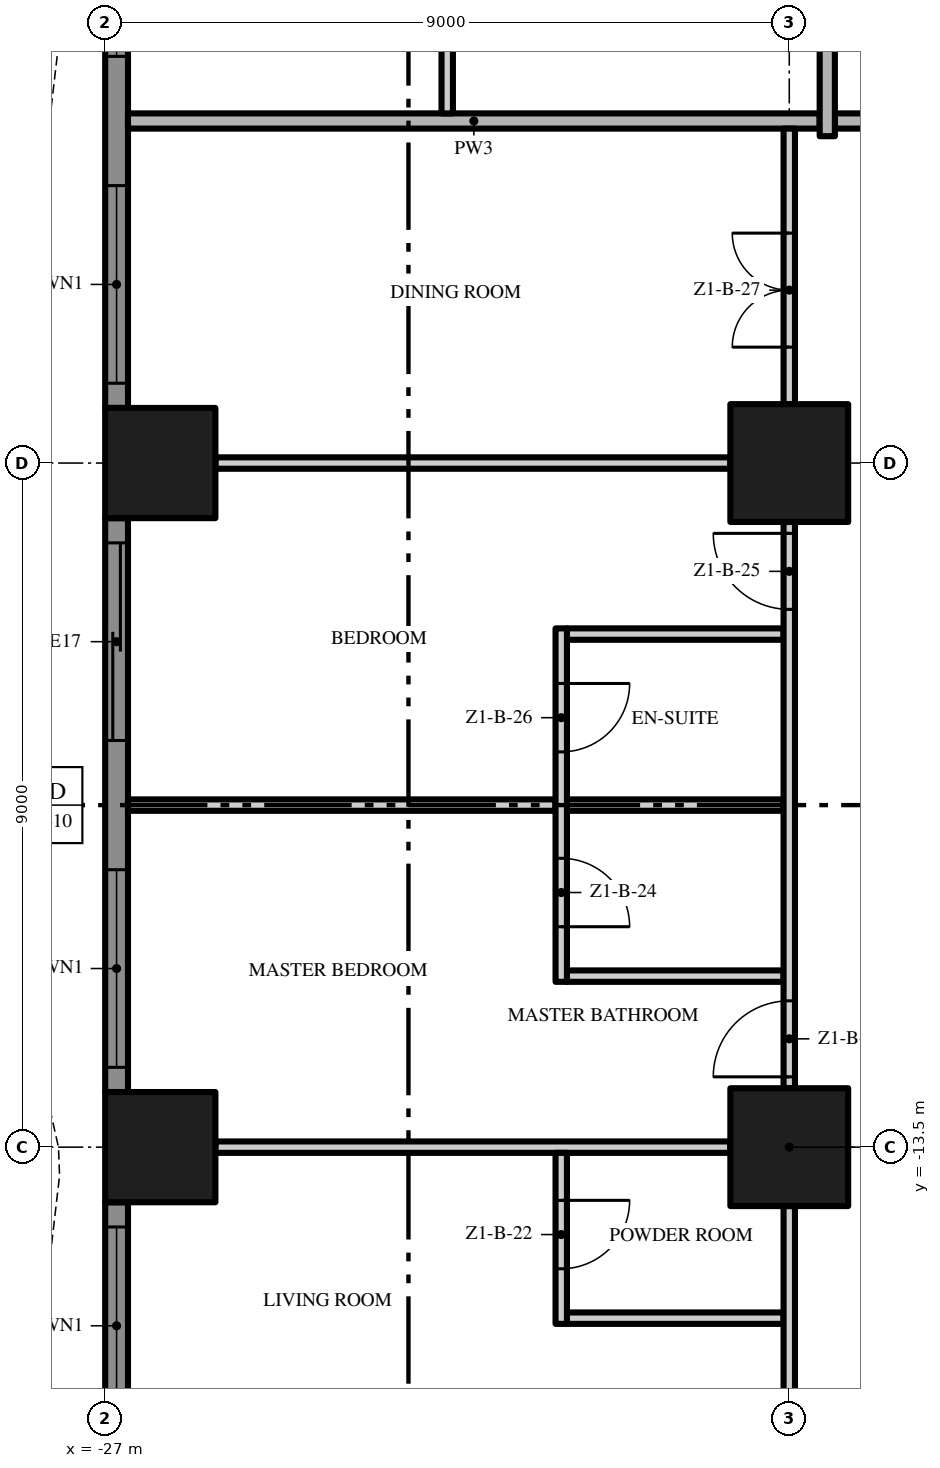
"""IFC4 building model, lengths in metres.
Left out: names, types, materials, properties, quantities, classifications, styles, units other than length and angle.
Written with IfcOpenShell. Run it as: python <this file> out.ifc"""

import sys

from ifc_helpers import new_model, si_unit, direction, frame, frame_2d, origin, origin_2d, place, context, subcontext, project, spatial, polyline, rectangle, outline, extrude, element, fill, save


model = new_model("IFC4")
c1 = context("Model", 3, precision=1e-05, world=origin(), true_north=direction((0.0, 1.0)))
c2 = subcontext(c1, "Body", "Model", "MODEL_VIEW")
j1 = project(units=[si_unit("LENGTHUNIT", "METRE"), si_unit("PLANEANGLEUNIT", "RADIAN")], contexts=[c1])
p1 = place(None, origin())
s1 = spatial("IfcSite", under=j1, at=p1, CompositionType="ELEMENT")
p2 = place(p1, origin())
s2 = spatial("IfcBuilding", under=s1, at=p2, CompositionType="ELEMENT")
p3 = place(p2, frame((0.0, 0.0, 34.0)))
s3 = spatial("IfcBuildingStorey", under=s2, at=p3, CompositionType="ELEMENT", Elevation=34.0)
for number, where, z_axis, x_axis in (
    (1, (-18.0, -13.5, 0.0), (0.0, 0.0, 1.0), (1.0, 0.0, 0.0)),
    (2, (-18.0, -4.5, 0.0), (0.0, 0.0, 1.0), (1.0, 0.0, 0.0)),
):
    element("IfcColumn", number, at=place(p3, frame(where, z_axis=z_axis, x_axis=x_axis)), inside=s3, PredefinedType="COLUMN", context=c2, shape_type="SweptSolid", body=[
        extrude(rectangle(XDim=1.55, YDim=1.55, at=origin_2d()), origin(), (0.0, 0.0, 1.0), 3.5),
    ])
for number, where, z_axis, x_axis in (
    (3, (-26.275, -13.5, 0.0), (0.0, 0.0, 1.0), (1.0, 0.0, 0.0)),
    (4, (-26.275, -4.5, 0.0), (0.0, 0.0, 1.0), (1.0, 0.0, 0.0)),
):
    element("IfcColumn", number, at=place(p3, frame(where, z_axis=z_axis, x_axis=x_axis)), inside=s3, PredefinedType="COLUMN", context=c2, shape_type="SweptSolid", body=[
        extrude(rectangle(XDim=1.45, YDim=1.45, at=origin_2d()), origin(), (0.0, 0.0, 1.0), 3.5),
    ])
p4 = place(p3, frame((-26.85, -3.775, 0.0), z_axis=(0.0, 0.0, 1.0), x_axis=(0.0, 1.0, 0.0)))
e5 = element("IfcWall", 5, at=p4, inside=s3, PredefinedType="SOLIDWALL", context=c2, shape_type="SweptSolid", body=[
    extrude(rectangle(XDim=7.55, YDim=0.3, at=frame_2d((3.775, 0.0))), origin(), (0.0, 0.0, 1.0), 3.5),
])
p5 = place(p4, frame((4.625, 0.0, 0.45)))
e6 = element("IfcOpeningElement", 6, at=p5, cuts=e5, PredefinedType="OPENING", context=c2, shape_type="SweptSolid", body=[
    extrude(rectangle(XDim=2.6, YDim=2.65, at=frame_2d((1.3, 1.325))), frame((0.0, 0.16, 0.0), z_axis=(0.0, -1.0, 0.0), x_axis=(1.0, 0.0, 0.0)), (0.0, 0.0, 1.0), 0.32),
])
p6 = place(p4, frame((0.325, 0.0, 0.45)))
e7 = element("IfcOpeningElement", 7, at=p6, cuts=e5, PredefinedType="OPENING", context=c2, shape_type="SweptSolid", body=[
    extrude(rectangle(XDim=2.6, YDim=2.65, at=frame_2d((1.3, 1.325))), frame((0.0, 0.16, 0.0), z_axis=(0.0, -1.0, 0.0), x_axis=(1.0, 0.0, 0.0)), (0.0, 0.0, 1.0), 0.32),
])
p7 = place(p3, frame((-26.85, -12.775, 0.0), z_axis=(0.0, 0.0, 1.0), x_axis=(0.0, 1.0, 0.0)))
e8 = element("IfcWall", 8, at=p7, inside=s3, PredefinedType="SOLIDWALL", context=c2, shape_type="SweptSolid", body=[
    extrude(rectangle(XDim=7.55, YDim=0.3, at=frame_2d((3.775, 0.0))), origin(), (0.0, 0.0, 1.0), 3.5),
])
p8 = place(p7, frame((4.625, 0.0, 0.0)))
e9 = element("IfcOpeningElement", 9, at=p8, cuts=e8, PredefinedType="OPENING", context=c2, shape_type="SweptSolid", body=[
    extrude(rectangle(XDim=2.6, YDim=2.4, at=frame_2d((1.3, 1.2))), frame((0.0, 0.16, 0.0), z_axis=(0.0, -1.0, 0.0), x_axis=(1.0, 0.0, 0.0)), (0.0, 0.0, 1.0), 0.32),
])
p9 = place(p7, frame((0.325, 0.0, 0.45)))
e10 = element("IfcOpeningElement", 10, at=p9, cuts=e8, PredefinedType="OPENING", context=c2, shape_type="SweptSolid", body=[
    extrude(rectangle(XDim=2.6, YDim=2.65, at=frame_2d((1.3, 1.325))), frame((0.0, 0.16, 0.0), z_axis=(0.0, -1.0, 0.0), x_axis=(1.0, 0.0, 0.0)), (0.0, 0.0, 1.0), 0.32),
])
p10 = place(p3, frame((-26.85, -18.0, 0.0), z_axis=(0.0, 0.0, 1.0), x_axis=(0.0, 1.0, 0.0)))
e11 = element("IfcWall", 11, at=p10, inside=s3, PredefinedType="SOLIDWALL", context=c2, shape_type="SweptSolid", body=[
    extrude(rectangle(XDim=3.775, YDim=0.3, at=frame_2d((1.887, 0.0))), origin(), (0.0, 0.0, 1.0), 3.5),
])
p11 = place(p10, frame((0.85, 0.0, 0.45)))
e12 = element("IfcOpeningElement", 12, at=p11, cuts=e11, PredefinedType="OPENING", context=c2, shape_type="SweptSolid", body=[
    extrude(rectangle(XDim=2.6, YDim=2.65, at=frame_2d((1.3, 1.325))), frame((0.0, 0.16, 0.0), z_axis=(0.0, -1.0, 0.0), x_axis=(1.0, 0.0, 0.0)), (0.0, 0.0, 1.0), 0.32),
])
p12 = place(p3, origin())
e13 = element("IfcWall", 13, at=p12, inside=s3, PredefinedType="USERDEFINED", context=c2, shape_type="SweptSolid", body=[
    extrude(outline(polyline([(-27.951, 18.0), (-27.615, 16.5), (-27.6, 16.125), (-27.731, 15.0), (-28.255, 13.5), (-28.988, 12.0), (-29.649, 10.5), (-29.985, 9.0), (-30.0, 8.625), (-29.869, 7.5), (-29.345, 6.0), (-28.612, 4.5), (-27.951, 3.0), (-27.615, 1.5), (-27.6, 1.125), (-27.731, 0.0), (-28.255, -1.5), (-28.988, -3.0), (-29.649, -4.5), (-29.985, -6.0), (-30.0, -6.375), (-29.869, -7.5), (-29.345, -9.0), (-28.612, -10.5), (-27.951, -12.0), (-27.615, -13.5), (-27.6, -13.875), (-27.731, -15.0), (-28.255, -16.5), (-28.988, -18.0), (-28.763, -18.11), (-28.024, -16.596), (-27.486, -15.056), (-27.349, -13.885), (-27.366, -13.467), (-27.713, -11.921), (-28.385, -10.395), (-29.114, -8.904), (-29.624, -7.444), (-29.749, -6.365), (-29.736, -6.033), (-29.41, -4.579), (-28.761, -3.105), (-28.024, -1.596), (-27.486, -0.056), (-27.349, 1.115), (-27.366, 1.533), (-27.713, 3.079), (-28.385, 4.605), (-29.114, 6.096), (-29.624, 7.556), (-29.749, 8.635), (-29.736, 8.967), (-29.41, 10.421), (-28.761, 11.895), (-28.024, 13.404), (-27.486, 14.944), (-27.349, 16.115), (-27.366, 16.533), (-27.708, 18.055), (-27.951, 18.0)])), origin(), (0.0, 0.0, 1.0), 0.9),
])
p13 = place(p3, frame((-20.925, -15.75, 0.0), z_axis=(0.0, 0.0, 1.0), x_axis=(1.0, 0.0, 0.0)))
e14 = element("IfcWall", 14, at=p13, inside=s3, PredefinedType="PARTITIONING", context=c2, shape_type="SweptSolid", body=[
    extrude(rectangle(XDim=2.85, YDim=0.15, at=frame_2d((1.425, 0.0))), origin(), (0.0, 0.0, 1.0), 3.5),
])
p14 = place(p3, frame((-25.55, -13.5, 0.0), z_axis=(0.0, 0.0, 1.0), x_axis=(1.0, 0.0, 0.0)))
e15 = element("IfcWall", 15, at=p14, inside=s3, PredefinedType="PARTITIONING", context=c2, shape_type="SweptSolid", body=[
    extrude(rectangle(XDim=6.775, YDim=0.15, at=frame_2d((3.388, 0.0))), origin(), (0.0, 0.0, 1.0), 3.5),
])
p15 = place(p3, frame((-20.925, -11.25, 0.0), z_axis=(0.0, 0.0, 1.0), x_axis=(1.0, 0.0, 0.0)))
e16 = element("IfcWall", 16, at=p15, inside=s3, PredefinedType="PARTITIONING", context=c2, shape_type="SweptSolid", body=[
    extrude(rectangle(XDim=2.85, YDim=0.15, at=frame_2d((1.425, 0.0))), origin(), (0.0, 0.0, 1.0), 3.5),
])
p16 = place(p3, frame((-26.7, -9.0, 0.0), z_axis=(0.0, 0.0, 1.0), x_axis=(1.0, 0.0, 0.0)))
e17 = element("IfcWall", 17, at=p16, inside=s3, PredefinedType="PARTITIONING", context=c2, shape_type="SweptSolid", body=[
    extrude(rectangle(XDim=5.625, YDim=0.15, at=frame_2d((2.812, 0.0))), origin(), (0.0, 0.0, 1.0), 3.5),
])
for number, where, z_axis, x_axis in (
    (18, (-20.925, -9.0, 0.0), (0.0, 0.0, 1.0), (1.0, 0.0, 0.0)),
    (19, (-20.925, -6.75, 0.0), (0.0, 0.0, 1.0), (1.0, 0.0, 0.0)),
):
    element("IfcWall", number, at=place(p3, frame(where, z_axis=z_axis, x_axis=x_axis)), inside=s3, PredefinedType="PARTITIONING", context=c2, shape_type="SweptSolid", body=[
        extrude(rectangle(XDim=2.85, YDim=0.15, at=frame_2d((1.425, 0.0))), origin(), (0.0, 0.0, 1.0), 3.5),
    ])
p17 = place(p3, frame((-25.55, -4.5, 0.0), z_axis=(0.0, 0.0, 1.0), x_axis=(1.0, 0.0, 0.0)))
e20 = element("IfcWall", 20, at=p17, inside=s3, PredefinedType="PARTITIONING", context=c2, shape_type="SweptSolid", body=[
    extrude(rectangle(XDim=6.775, YDim=0.15, at=frame_2d((3.388, 0.0))), origin(), (0.0, 0.0, 1.0), 3.5),
])
p18 = place(p3, frame((-17.4, 0.0, 0.0), z_axis=(0.0, 0.0, 1.0), x_axis=(1.0, 0.0, 0.0)))
e21 = element("IfcWall", 21, at=p18, inside=s3, PredefinedType="PARTITIONING", context=c2, shape_type="SweptSolid", body=[
    extrude(rectangle(XDim=12.8, YDim=0.2, at=frame_2d((6.4, 0.0))), origin(), (0.0, 0.0, 1.0), 3.5),
])
p19 = place(p3, frame((-26.7, 0.0, 0.0), z_axis=(0.0, 0.0, 1.0), x_axis=(1.0, 0.0, 0.0)))
e22 = element("IfcWall", 22, at=p19, inside=s3, PredefinedType="PARTITIONING", context=c2, shape_type="SweptSolid", body=[
    extrude(rectangle(XDim=9.1, YDim=0.2, at=frame_2d((4.55, 0.0))), origin(), (0.0, 0.0, 1.0), 3.5),
])
p20 = place(p3, frame((-22.5, 0.1, 0.0), z_axis=(0.0, 0.0, 1.0), x_axis=(0.0, 1.0, 0.0)))
e23 = element("IfcWall", 23, at=p20, inside=s3, PredefinedType="PARTITIONING", context=c2, shape_type="SweptSolid", body=[
    extrude(rectangle(XDim=17.175, YDim=0.15, at=frame_2d((8.588, 0.0))), origin(), (0.0, 0.0, 1.0), 3.5),
])
p21 = place(p20, frame((1.65, 0.0, 0.0)))
e24 = element("IfcOpeningElement", 24, at=p21, cuts=e23, PredefinedType="OPENING", context=c2, shape_type="SweptSolid", body=[
    extrude(rectangle(XDim=1.0, YDim=2.4, at=frame_2d((0.5, 1.2))), frame((0.0, 0.085, 0.0), z_axis=(0.0, -1.0, 0.0), x_axis=(1.0, 0.0, 0.0)), (0.0, 0.0, 1.0), 0.17),
])
p22 = place(p20, frame((8.0, 0.0, 0.0)))
e25 = element("IfcOpeningElement", 25, at=p22, cuts=e23, PredefinedType="OPENING", context=c2, shape_type="SweptSolid", body=[
    extrude(rectangle(XDim=1.8, YDim=2.4, at=frame_2d((0.9, 1.2))), frame((0.0, 0.085, 0.0), z_axis=(0.0, -1.0, 0.0), x_axis=(1.0, 0.0, 0.0)), (0.0, 0.0, 1.0), 0.17),
])
p23 = place(p20, frame((16.025, 0.0, 0.0)))
e26 = element("IfcOpeningElement", 26, at=p23, cuts=e23, PredefinedType="OPENING", context=c2, shape_type="SweptSolid", body=[
    extrude(rectangle(XDim=1.0, YDim=2.4, at=frame_2d((0.5, 1.2))), frame((0.0, 0.085, 0.0), z_axis=(0.0, -1.0, 0.0), x_axis=(1.0, 0.0, 0.0)), (0.0, 0.0, 1.0), 0.17),
])
p24 = place(p3, frame((-21.0, -13.575, 0.0), z_axis=(0.0, 0.0, 1.0), x_axis=(0.0, -1.0, 0.0)))
e27 = element("IfcWall", 27, at=p24, inside=s3, PredefinedType="PARTITIONING", context=c2, shape_type="SweptSolid", body=[
    extrude(rectangle(XDim=2.25, YDim=0.15, at=frame_2d((1.125, 0.0))), origin(), (0.0, 0.0, 1.0), 3.5),
])
p25 = place(p24, frame((0.625, 0.0, 0.0)))
e28 = element("IfcOpeningElement", 28, at=p25, cuts=e27, PredefinedType="OPENING", context=c2, shape_type="SweptSolid", body=[
    extrude(rectangle(XDim=0.9, YDim=2.1, at=frame_2d((0.45, 1.05))), frame((0.0, 0.085, 0.0), z_axis=(0.0, -1.0, 0.0), x_axis=(1.0, 0.0, 0.0)), (0.0, 0.0, 1.0), 0.17),
])
p26 = place(p3, frame((-21.0, -6.675, 0.0), z_axis=(0.0, 0.0, 1.0), x_axis=(0.0, -1.0, 0.0)))
e29 = element("IfcWall", 29, at=p26, inside=s3, PredefinedType="PARTITIONING", context=c2, shape_type="SweptSolid", body=[
    extrude(rectangle(XDim=4.65, YDim=0.15, at=frame_2d((2.325, 0.0))), origin(), (0.0, 0.0, 1.0), 3.5),
])
p27 = place(p26, frame((3.025, 0.0, 0.0)))
e30 = element("IfcOpeningElement", 30, at=p27, cuts=e29, PredefinedType="OPENING", context=c2, shape_type="SweptSolid", body=[
    extrude(rectangle(XDim=0.9, YDim=2.1, at=frame_2d((0.45, 1.05))), frame((0.0, 0.085, 0.0), z_axis=(0.0, -1.0, 0.0), x_axis=(1.0, 0.0, 0.0)), (0.0, 0.0, 1.0), 0.17),
])
p28 = place(p26, frame((0.725, 0.0, 0.0)))
e31 = element("IfcOpeningElement", 31, at=p28, cuts=e29, PredefinedType="OPENING", context=c2, shape_type="SweptSolid", body=[
    extrude(rectangle(XDim=0.9, YDim=2.1, at=frame_2d((0.45, 1.05))), frame((0.0, 0.085, 0.0), z_axis=(0.0, -1.0, 0.0), x_axis=(1.0, 0.0, 0.0)), (0.0, 0.0, 1.0), 0.17),
])
p29 = place(p3, frame((-18.0, -21.05, 0.0), z_axis=(0.0, 0.0, 1.0), x_axis=(0.0, 1.0, 0.0)))
e32 = element("IfcWall", 32, at=p29, inside=s3, PredefinedType="PARTITIONING", context=c2, shape_type="SweptSolid", body=[
    extrude(rectangle(XDim=6.775, YDim=0.15, at=frame_2d((3.388, 0.0))), origin(), (0.0, 0.0, 1.0), 3.5),
])
p30 = place(p29, frame((1.0, 0.0, 0.0)))
e33 = element("IfcOpeningElement", 33, at=p30, cuts=e32, PredefinedType="OPENING", context=c2, shape_type="SweptSolid", body=[
    extrude(rectangle(XDim=1.8, YDim=2.4, at=frame_2d((0.9, 1.2))), frame((0.0, 0.085, 0.0), z_axis=(0.0, -1.0, 0.0), x_axis=(1.0, 0.0, 0.0)), (0.0, 0.0, 1.0), 0.17),
])
p31 = place(p3, frame((-18.0, -12.725, 0.0), z_axis=(0.0, 0.0, 1.0), x_axis=(0.0, 1.0, 0.0)))
e34 = element("IfcWall", 34, at=p31, inside=s3, PredefinedType="PARTITIONING", context=c2, shape_type="SweptSolid", body=[
    extrude(rectangle(XDim=7.45, YDim=0.15, at=frame_2d((3.725, 0.0))), origin(), (0.0, 0.0, 1.0), 3.5),
])
p32 = place(p31, frame((0.15, 0.0, 0.0)))
e35 = element("IfcOpeningElement", 35, at=p32, cuts=e34, PredefinedType="OPENING", context=c2, shape_type="SweptSolid", body=[
    extrude(rectangle(XDim=1.0, YDim=2.4, at=frame_2d((0.5, 1.2))), frame((0.0, 0.085, 0.0), z_axis=(0.0, -1.0, 0.0), x_axis=(1.0, 0.0, 0.0)), (0.0, 0.0, 1.0), 0.17),
])
p33 = place(p31, frame((6.3, 0.0, 0.0)))
e36 = element("IfcOpeningElement", 36, at=p33, cuts=e34, PredefinedType="OPENING", context=c2, shape_type="SweptSolid", body=[
    extrude(rectangle(XDim=1.0, YDim=2.4, at=frame_2d((0.5, 1.2))), frame((0.0, 0.085, 0.0), z_axis=(0.0, -1.0, 0.0), x_axis=(1.0, 0.0, 0.0)), (0.0, 0.0, 1.0), 0.17),
])
p34 = place(p3, frame((-18.0, -3.725, 0.0), z_axis=(0.0, 0.0, 1.0), x_axis=(0.0, 1.0, 0.0)))
e37 = element("IfcWall", 37, at=p34, inside=s3, PredefinedType="PARTITIONING", context=c2, shape_type="SweptSolid", body=[
    extrude(rectangle(XDim=3.625, YDim=0.15, at=frame_2d((1.812, 0.0))), origin(), (0.0, 0.0, 1.0), 3.5),
])
p35 = place(p34, frame((0.75, 0.0, 0.0)))
e38 = element("IfcOpeningElement", 38, at=p35, cuts=e37, PredefinedType="OPENING", context=c2, shape_type="SweptSolid", body=[
    extrude(rectangle(XDim=1.5, YDim=2.4, at=frame_2d((0.75, 1.2))), frame((0.0, 0.085, 0.0), z_axis=(0.0, -1.0, 0.0), x_axis=(1.0, 0.0, 0.0)), (0.0, 0.0, 1.0), 0.17),
])
p36 = place(p3, frame((-17.5, -0.2, 0.0), z_axis=(0.0, 0.0, 1.0), x_axis=(0.0, 1.0, 0.0)))
e39 = element("IfcWall", 39, at=p36, inside=s3, PredefinedType="PARTITIONING", context=c2, shape_type="SweptSolid", body=[
    extrude(rectangle(XDim=3.925, YDim=0.2, at=frame_2d((1.962, 0.0))), origin(), (0.0, 0.0, 1.0), 3.5),
])
p37 = place(p5, origin())
e40 = element("IfcWindow", 40, at=p37, inside=s3, PartitioningType="SINGLE_PANEL", PredefinedType="WINDOW", context=c2, shape_type="SweptSolid", body=[
    extrude(rectangle(XDim=2.6, YDim=2.65, at=frame_2d((1.3, 1.325))), frame((0.0, 0.03, 0.0), z_axis=(0.0, -1.0, 0.0), x_axis=(1.0, 0.0, 0.0)), (0.0, 0.0, 1.0), 0.06),
])
fill(e6, e40)
p38 = place(p6, origin())
e41 = element("IfcWindow", 41, at=p38, inside=s3, PartitioningType="SINGLE_PANEL", PredefinedType="WINDOW", context=c2, shape_type="SweptSolid", body=[
    extrude(rectangle(XDim=2.6, YDim=2.65, at=frame_2d((1.3, 1.325))), frame((0.0, 0.03, 0.0), z_axis=(0.0, -1.0, 0.0), x_axis=(1.0, 0.0, 0.0)), (0.0, 0.0, 1.0), 0.06),
])
fill(e7, e41)
p39 = place(p8, origin())
e42 = element("IfcDoor", 42, at=p39, inside=s3, OperationType="SINGLE_SWING_LEFT", PredefinedType="DOOR", context=c2, shape_type="SweptSolid", body=[
    extrude(rectangle(XDim=2.6, YDim=2.4, at=frame_2d((1.3, 1.2))), frame((0.0, 0.025, 0.0), z_axis=(0.0, -1.0, 0.0), x_axis=(1.0, 0.0, 0.0)), (0.0, 0.0, 1.0), 0.05),
])
fill(e9, e42)
p40 = place(p9, origin())
e43 = element("IfcWindow", 43, at=p40, inside=s3, PartitioningType="SINGLE_PANEL", PredefinedType="WINDOW", context=c2, shape_type="SweptSolid", body=[
    extrude(rectangle(XDim=2.6, YDim=2.65, at=frame_2d((1.3, 1.325))), frame((0.0, 0.03, 0.0), z_axis=(0.0, -1.0, 0.0), x_axis=(1.0, 0.0, 0.0)), (0.0, 0.0, 1.0), 0.06),
])
fill(e10, e43)
p41 = place(p11, origin())
e44 = element("IfcWindow", 44, at=p41, inside=s3, PartitioningType="SINGLE_PANEL", PredefinedType="WINDOW", context=c2, shape_type="SweptSolid", body=[
    extrude(rectangle(XDim=2.6, YDim=2.65, at=frame_2d((1.3, 1.325))), frame((0.0, 0.03, 0.0), z_axis=(0.0, -1.0, 0.0), x_axis=(1.0, 0.0, 0.0)), (0.0, 0.0, 1.0), 0.06),
])
fill(e12, e44)
p42 = place(p25, origin())
e45 = element("IfcDoor", 45, at=p42, inside=s3, OperationType="SINGLE_SWING_LEFT", PredefinedType="DOOR", context=c2, shape_type="SweptSolid", body=[
    extrude(rectangle(XDim=0.9, YDim=2.1, at=frame_2d((0.45, 1.05))), frame((0.0, 0.025, 0.0), z_axis=(0.0, -1.0, 0.0), x_axis=(1.0, 0.0, 0.0)), (0.0, 0.0, 1.0), 0.05),
])
fill(e28, e45)
p43 = place(p32, origin())
e46 = element("IfcDoor", 46, at=p43, inside=s3, OperationType="SINGLE_SWING_LEFT", PredefinedType="DOOR", context=c2, shape_type="SweptSolid", body=[
    extrude(rectangle(XDim=1.0, YDim=2.4, at=frame_2d((0.5, 1.2))), frame((0.0, 0.025, 0.0), z_axis=(0.0, -1.0, 0.0), x_axis=(1.0, 0.0, 0.0)), (0.0, 0.0, 1.0), 0.05),
])
fill(e35, e46)
p44 = place(p27, origin())
e47 = element("IfcDoor", 47, at=p44, inside=s3, OperationType="SINGLE_SWING_RIGHT", PredefinedType="DOOR", context=c2, shape_type="SweptSolid", body=[
    extrude(rectangle(XDim=0.9, YDim=2.1, at=frame_2d((0.45, 1.05))), frame((0.0, 0.025, 0.0), z_axis=(0.0, -1.0, 0.0), x_axis=(1.0, 0.0, 0.0)), (0.0, 0.0, 1.0), 0.05),
])
fill(e30, e47)
p45 = place(p33, origin())
e48 = element("IfcDoor", 48, at=p45, inside=s3, OperationType="SINGLE_SWING_RIGHT", PredefinedType="DOOR", context=c2, shape_type="SweptSolid", body=[
    extrude(rectangle(XDim=1.0, YDim=2.4, at=frame_2d((0.5, 1.2))), frame((0.0, 0.025, 0.0), z_axis=(0.0, -1.0, 0.0), x_axis=(1.0, 0.0, 0.0)), (0.0, 0.0, 1.0), 0.05),
])
fill(e36, e48)
p46 = place(p28, origin())
e49 = element("IfcDoor", 49, at=p46, inside=s3, OperationType="SINGLE_SWING_LEFT", PredefinedType="DOOR", context=c2, shape_type="SweptSolid", body=[
    extrude(rectangle(XDim=0.9, YDim=2.1, at=frame_2d((0.45, 1.05))), frame((0.0, 0.025, 0.0), z_axis=(0.0, -1.0, 0.0), x_axis=(1.0, 0.0, 0.0)), (0.0, 0.0, 1.0), 0.05),
])
fill(e31, e49)
p47 = place(p35, origin())
e50 = element("IfcDoor", 50, at=p47, inside=s3, OperationType="DOUBLE_DOOR_SINGLE_SWING", PredefinedType="DOOR", context=c2, shape_type="SweptSolid", body=[
    extrude(rectangle(XDim=1.5, YDim=2.4, at=frame_2d((0.75, 1.2))), frame((0.0, 0.025, 0.0), z_axis=(0.0, -1.0, 0.0), x_axis=(1.0, 0.0, 0.0)), (0.0, 0.0, 1.0), 0.05),
])
fill(e38, e50)
save(model, sys.argv[1])
